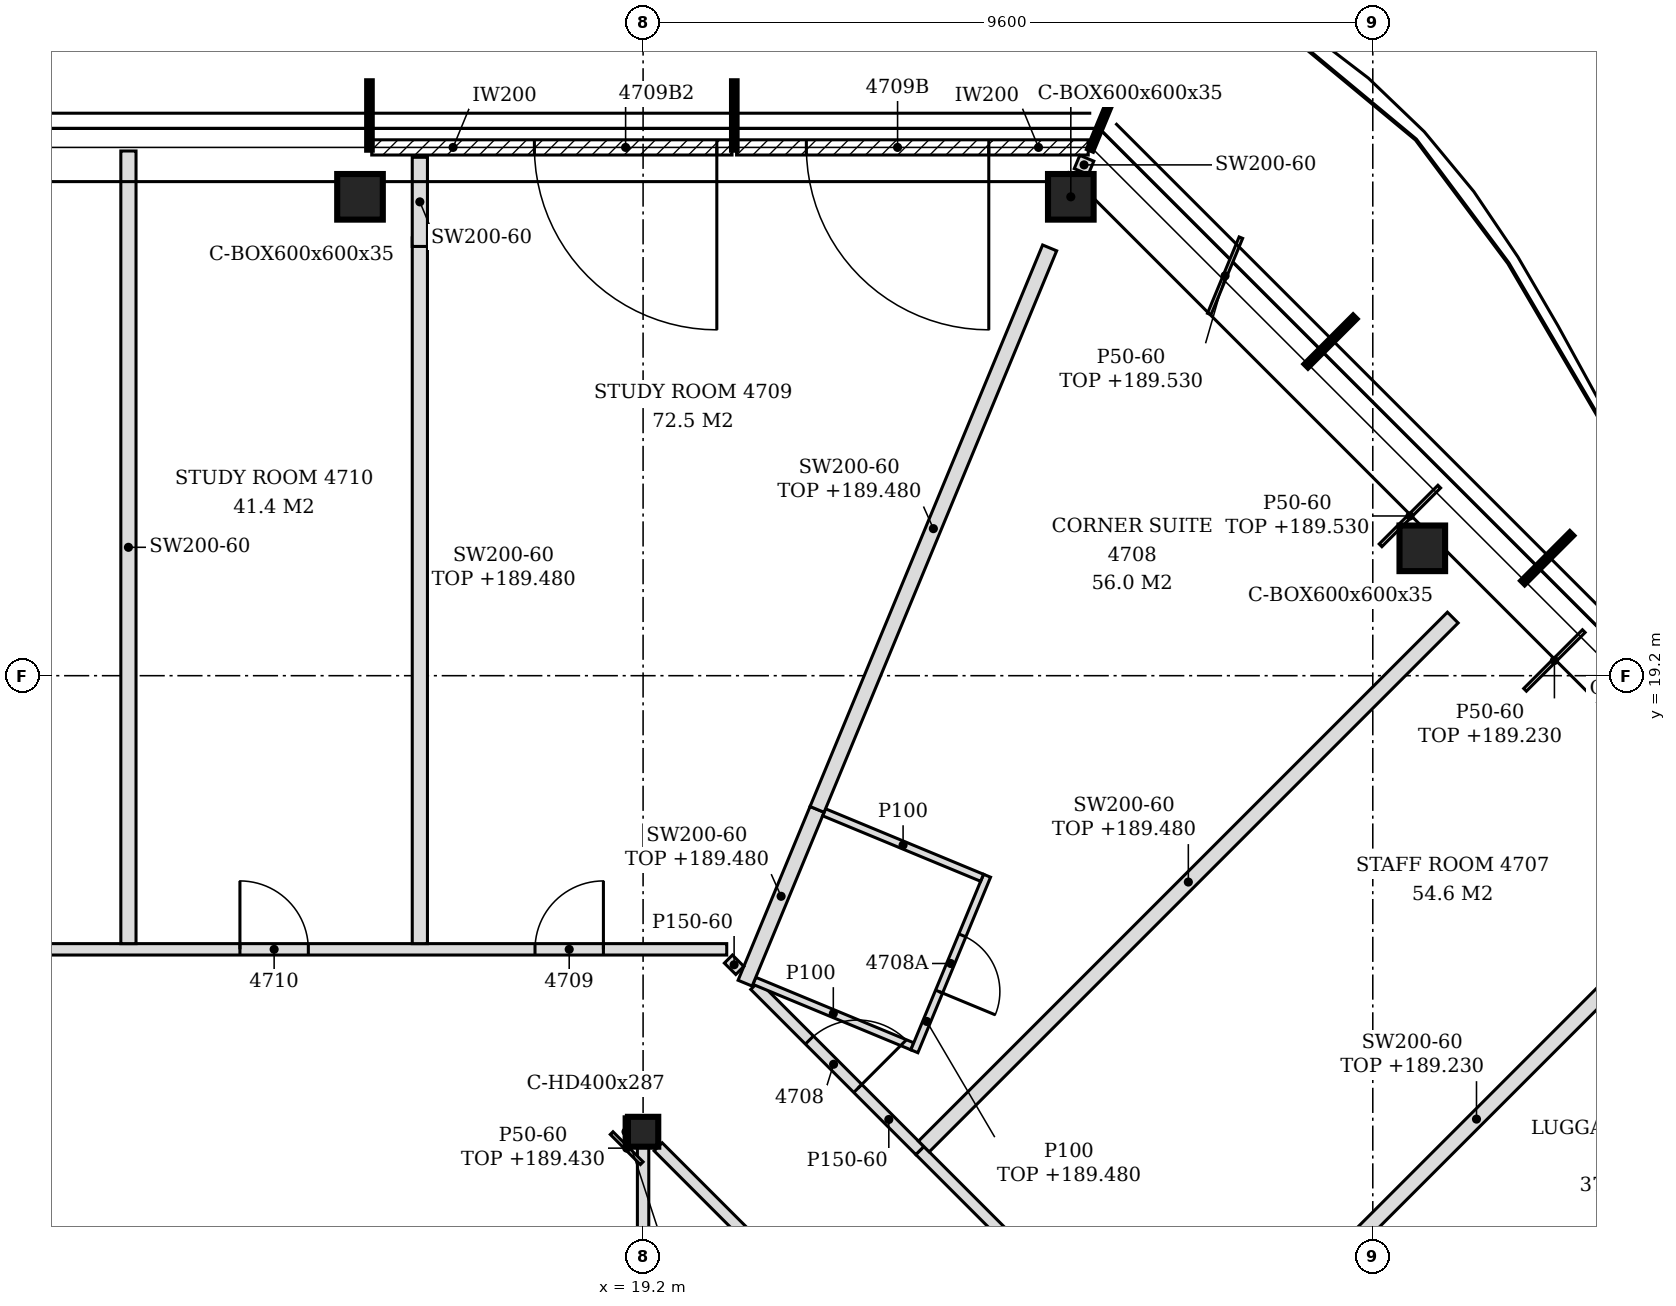
"""IFC4 building model, lengths in metres.
Left out: names, types, materials, properties, quantities, classifications, styles, units other than length and angle.
Written with IfcOpenShell. Run it as: python <this file> out.ifc"""

import sys

from ifc_helpers import new_model, si_unit, direction, frame, frame_2d, origin, origin_2d, place, context, subcontext, project, spatial, polyline, rectangle, hollow_rectangle, i_section, outline, extrude, clip, halfspace, element, fill, save


model = new_model("IFC4")
c1 = context("Model", 3, precision=1e-05, world=origin(), true_north=direction((0.0, 1.0)))
c2 = subcontext(c1, "Body", "Model", "MODEL_VIEW")
j1 = project(units=[si_unit("LENGTHUNIT", "METRE"), si_unit("PLANEANGLEUNIT", "RADIAN")], contexts=[c1])
p1 = place(None, origin())
s1 = spatial("IfcSite", under=j1, at=p1, CompositionType="ELEMENT")
p2 = place(p1, origin())
s2 = spatial("IfcBuilding", under=s1, at=p2, CompositionType="ELEMENT")
p3 = place(p2, frame((0.0, 0.0, 186.6)))
s3 = spatial("IfcBuildingStorey", under=s2, at=p3, CompositionType="ELEMENT", Elevation=186.6)
p4 = place(p3, frame((29.451, 20.876, -0.15), z_axis=(0.38726387287, -0.258155907814, 0.885088820419), x_axis=(0.554670435147, 0.832070134288, 0.0)))
e1 = element("IfcColumn", 1, at=p4, inside=s3, PredefinedType="COLUMN", context=c2, shape_type="Clipping", body=[
    clip(extrude(hollow_rectangle(XDim=0.6, YDim=0.6, WallThickness=0.035, at=origin_2d()), origin(), (0.0, 0.0, 1.0), 4.067), halfspace(frame((0.0, 0.0, 4.049), z_axis=(0.0, 0.0, 1.0), x_axis=(1.0, 0.0, 0.0)), False)),
])
p5 = place(p3, frame((24.827, 25.5, -0.15), z_axis=(0.387212850535, -0.258161908255, 0.885109392961), x_axis=(0.554729959787, 0.832030451194, 0.0)))
e2 = element("IfcColumn", 2, at=p5, inside=s3, PredefinedType="COLUMN", context=c2, shape_type="Clipping", body=[
    clip(extrude(hollow_rectangle(XDim=0.6, YDim=0.6, WallThickness=0.035, at=origin_2d()), origin(), (0.0, 0.0, 1.0), 4.067), halfspace(frame((0.0, 0.0, 4.049), z_axis=(0.0, 0.0, 1.0), x_axis=(1.0, 0.0, 0.0)), False)),
])
p6 = place(p3, frame((15.476, 25.5, -0.15), z_axis=(0.38726387287, -0.258155907814, 0.885088820419), x_axis=(0.554670435147, 0.832070134288, 0.0)))
e3 = element("IfcColumn", 3, at=p6, inside=s3, PredefinedType="COLUMN", context=c2, shape_type="Clipping", body=[
    clip(extrude(hollow_rectangle(XDim=0.6, YDim=0.6, WallThickness=0.035, at=origin_2d()), origin(), (0.0, 0.0, 1.0), 4.067), halfspace(frame((0.0, 0.0, 4.049), z_axis=(0.0, 0.0, 1.0), x_axis=(1.0, 0.0, 0.0)), False)),
])
p7 = place(p3, frame((19.2, 13.2, -0.15), z_axis=(0.0, 0.0, 1.0), x_axis=(1.0, 0.0, 0.0)))
e4 = element("IfcColumn", 4, at=p7, inside=s3, PredefinedType="COLUMN", context=c2, shape_type="SweptSolid", body=[
    extrude(i_section(OverallWidth=0.399, OverallDepth=0.393, WebThickness=0.023, FlangeThickness=0.037, FilletRadius=0.015, at=origin_2d()), origin(), (0.0, 0.0, 1.0), 3.6),
])
p8 = place(p3, frame((25.056, 26.15, 0.0), z_axis=(0.0, 0.0, 1.0), x_axis=(-1.0, 0.0, 0.0)))
e5 = element("IfcWall", 5, at=p8, inside=s3, PredefinedType="NOTDEFINED", context=c2, shape_type="SweptSolid", body=[
    extrude(rectangle(XDim=4.626, YDim=0.2, at=frame_2d((2.313, 0.0))), origin(), (0.0, 0.0, 1.0), 3.45),
])
p9 = place(p8, frame((1.308, 0.0, 0.0)))
e6 = element("IfcOpeningElement", 6, at=p9, cuts=e5, PredefinedType="OPENING", context=c2, shape_type="SweptSolid", body=[
    extrude(rectangle(XDim=2.4, YDim=2.4, at=frame_2d((1.2, 1.2))), frame((0.0, 0.11, 0.0), z_axis=(0.0, -1.0, 0.0), x_axis=(1.0, 0.0, 0.0)), (0.0, 0.0, 1.0), 0.22),
])
p10 = place(p3, frame((20.37, 26.15, 0.0), z_axis=(0.0, 0.0, 1.0), x_axis=(-1.0, 0.0, 0.0)))
e7 = element("IfcWall", 7, at=p10, inside=s3, PredefinedType="NOTDEFINED", context=c2, shape_type="SweptSolid", body=[
    extrude(rectangle(XDim=4.74, YDim=0.2, at=frame_2d((2.37, 0.0))), origin(), (0.0, 0.0, 1.0), 3.45),
])
p11 = place(p10, frame((0.2, 0.0, 0.0)))
e8 = element("IfcOpeningElement", 8, at=p11, cuts=e7, PredefinedType="OPENING", context=c2, shape_type="SweptSolid", body=[
    extrude(rectangle(XDim=2.4, YDim=2.4, at=frame_2d((1.2, 1.2))), frame((0.0, 0.11, 0.0), z_axis=(0.0, -1.0, 0.0), x_axis=(1.0, 0.0, 0.0)), (0.0, 0.0, 1.0), 0.22),
])
p12 = place(p3, frame((19.2, 2.596, 0.0), z_axis=(0.0, 0.0, 1.0), x_axis=(0.0, 1.0, 0.0)))
e9 = element("IfcWall", 9, at=p12, inside=s3, PredefinedType="PARTITIONING", context=c2, shape_type="SweptSolid", body=[
    extrude(rectangle(XDim=10.407, YDim=0.15, at=frame_2d((5.204, 0.0))), origin(), (0.0, 0.0, 1.0), 2.83),
])
p13 = place(p12, frame((0.553, 0.0, 0.0)))
e10 = element("IfcOpeningElement", 10, at=p13, cuts=e9, PredefinedType="OPENING", context=c2, shape_type="SweptSolid", body=[
    extrude(rectangle(XDim=0.9, YDim=2.1, at=frame_2d((0.45, 1.05))), frame((0.0, 0.085, 0.0), z_axis=(0.0, -1.0, 0.0), x_axis=(1.0, 0.0, 0.0)), (0.0, 0.0, 1.0), 0.17),
])
p14 = place(p3, frame((27.529, 4.871, 0.0), z_axis=(0.0, 0.0, 1.0), x_axis=(-0.707106781187, 0.707106781187, 0.0)))
e11 = element("IfcWall", 11, at=p14, inside=s3, PredefinedType="PARTITIONING", context=c2, shape_type="SweptSolid", body=[
    extrude(rectangle(XDim=11.5, YDim=0.15, at=frame_2d((5.75, 0.0))), origin(), (0.0, 0.0, 1.0), 2.88),
])
p15 = place(p14, frame((0.85, 0.0, 0.0)))
e12 = element("IfcOpeningElement", 12, at=p15, cuts=e11, PredefinedType="OPENING", context=c2, shape_type="SweptSolid", body=[
    extrude(rectangle(XDim=0.8, YDim=2.1, at=frame_2d((0.4, 1.05))), frame((0.0, 0.085, 0.0), z_axis=(0.0, -1.0, 0.0), x_axis=(1.0, 0.0, 0.0)), (0.0, 0.0, 1.0), 0.17),
])
p16 = place(p3, frame((29.872, 5.922, 0.0), z_axis=(0.0, 0.0, 1.0), x_axis=(-0.707119057879, 0.707094504281, 0.0)))
e13 = element("IfcWall", 13, at=p16, inside=s3, PredefinedType="PARTITIONING", context=c2, shape_type="SweptSolid", body=[
    extrude(rectangle(XDim=9.943, YDim=0.15, at=frame_2d((4.972, 0.0))), origin(), (0.0, 0.0, 1.0), 2.88),
])
p17 = place(p16, frame((2.909, 0.0, 0.0)))
e14 = element("IfcOpeningElement", 14, at=p17, cuts=e13, PredefinedType="OPENING", context=c2, shape_type="SweptSolid", body=[
    extrude(rectangle(XDim=0.9, YDim=2.1, at=frame_2d((0.45, 1.05))), frame((0.0, 0.085, 0.0), z_axis=(0.0, -1.0, 0.0), x_axis=(1.0, 0.0, 0.0)), (0.0, 0.0, 1.0), 0.17),
])
p18 = place(p16, frame((7.05, 0.0, 0.0)))
e15 = element("IfcOpeningElement", 15, at=p18, cuts=e13, PredefinedType="OPENING", context=c2, shape_type="SweptSolid", body=[
    extrude(rectangle(XDim=0.9, YDim=2.1, at=frame_2d((0.45, 1.05))), frame((0.0, 0.085, 0.0), z_axis=(0.0, -1.0, 0.0), x_axis=(1.0, 0.0, 0.0)), (0.0, 0.0, 1.0), 0.17),
])
p19 = place(p3, frame((26.349, 9.551, 0.0), z_axis=(0.0, 0.0, 1.0), x_axis=(0.707095469378, 0.707118092814, 0.0)))
e16 = element("IfcWall", 16, at=p19, inside=s3, PredefinedType="PARTITIONING", context=c2, shape_type="SweptSolid", body=[
    extrude(rectangle(XDim=10.792, YDim=0.2, at=frame_2d((5.396, 0.0))), origin(), (0.0, 0.0, 1.0), 2.63),
])
p20 = place(p3, frame((31.408, 9.809, 0.0), z_axis=(0.0, 0.0, 1.0), x_axis=(0.707124140529, 0.707089421418, 0.0)))
e17 = element("IfcWall", 17, at=p20, inside=s3, PredefinedType="PARTITIONING", context=c2, shape_type="SweptSolid", body=[
    extrude(rectangle(XDim=7.032, YDim=0.2, at=frame_2d((3.516, 0.0))), origin(), (0.0, 0.0, 1.0), 2.93),
])
p21 = place(p20, frame((1.304, 0.0, 0.0)))
e18 = element("IfcOpeningElement", 18, at=p21, cuts=e17, PredefinedType="OPENING", context=c2, shape_type="SweptSolid", body=[
    extrude(rectangle(XDim=0.9, YDim=2.1, at=frame_2d((0.45, 1.05))), frame((0.0, 0.11, 0.0), z_axis=(0.0, -1.0, 0.0), x_axis=(1.0, 0.0, 0.0)), (0.0, 0.0, 1.0), 0.22),
])
p22 = place(p3, frame((22.841, 12.953, 0.0), z_axis=(0.0, 0.0, 1.0), x_axis=(-0.706947809344, 0.707265717297, 0.0)))
e19 = element("IfcWall", 19, at=p22, inside=s3, PredefinedType="PARTITIONING", context=c2, shape_type="SweptSolid", body=[
    extrude(rectangle(XDim=3.072, YDim=0.15, at=frame_2d((1.536, 0.0))), origin(), (0.0, 0.0, 1.0), 3.45),
])
p23 = place(p22, frame((1.155, 0.0, 0.0)))
e20 = element("IfcOpeningElement", 20, at=p23, cuts=e19, PredefinedType="OPENING", context=c2, shape_type="SweptSolid", body=[
    extrude(rectangle(XDim=0.9, YDim=2.1, at=frame_2d((0.45, 1.05))), frame((0.0, 0.085, 0.0), z_axis=(0.0, -1.0, 0.0), x_axis=(1.0, 0.0, 0.0)), (0.0, 0.0, 1.0), 0.17),
])
p24 = place(p3, frame((22.894, 13.006, 0.0), z_axis=(0.0, 0.0, 1.0), x_axis=(0.707106781187, 0.707106781187, 0.0)))
e21 = element("IfcWall", 21, at=p24, inside=s3, PredefinedType="PARTITIONING", context=c2, shape_type="SweptSolid", body=[
    extrude(rectangle(XDim=9.841, YDim=0.2, at=frame_2d((4.92, 0.0))), origin(), (0.0, 0.0, 1.0), 2.88),
])
p25 = place(p3, frame((22.742, 14.324, 0.0), z_axis=(0.0, 0.0, 1.0), x_axis=(-0.923772075785, 0.382942752901, 0.0)))
e22 = element("IfcWall", 22, at=p25, inside=s3, PredefinedType="PARTITIONING", context=c2, shape_type="SweptSolid", body=[
    extrude(rectangle(XDim=2.25, YDim=0.1, at=frame_2d((1.125, 0.0))), origin(), (0.0, 0.0, 1.0), 3.45),
])
p26 = place(p3, frame((22.769, 14.259, 0.0), z_axis=(0.0, 0.0, 1.0), x_axis=(0.382596216825, 0.923915653548, 0.0)))
e23 = element("IfcWall", 23, at=p26, inside=s3, PredefinedType="PARTITIONING", context=c2, shape_type="SweptSolid", body=[
    extrude(rectangle(XDim=2.5, YDim=0.1, at=frame_2d((1.25, 0.0))), origin(), (0.0, 0.0, 1.0), 2.88),
])
p27 = place(p26, frame((0.85, 0.0, 0.0)))
e24 = element("IfcOpeningElement", 24, at=p27, cuts=e23, PredefinedType="OPENING", context=c2, shape_type="SweptSolid", body=[
    extrude(rectangle(XDim=0.8, YDim=2.1, at=frame_2d((0.4, 1.05))), frame((0.0, 0.06, 0.0), z_axis=(0.0, -1.0, 0.0), x_axis=(1.0, 0.0, 0.0)), (0.0, 0.0, 1.0), 0.12),
])
p28 = place(p3, frame((20.542, 15.155, 0.0), z_axis=(0.0, 0.0, 1.0), x_axis=(0.382624834073, 0.923903802542, 0.0)))
e25 = element("IfcWall", 25, at=p28, inside=s3, PredefinedType="PARTITIONING", context=c2, shape_type="SweptSolid", body=[
    extrude(rectangle(XDim=2.474, YDim=0.2, at=frame_2d((1.237, 0.0))), origin(), (0.0, 0.0, 1.0), 2.88),
])
p29 = place(p3, frame((20.472, 15.322, 0.0), z_axis=(0.0, 0.0, 1.0), x_axis=(-0.707682835304, 0.706530257396, 0.0)))
e26 = element("IfcWall", 26, at=p29, inside=s3, PredefinedType="PARTITIONING", context=c2, shape_type="SweptSolid", body=[
    extrude(rectangle(XDim=0.212, YDim=0.15, at=frame_2d((0.106, 0.0))), origin(), (0.0, 0.0, 1.0), 3.45),
])
p30 = place(p3, frame((-5.9, 15.6, 0.0), z_axis=(0.0, 0.0, 1.0), x_axis=(1.0, 0.0, 0.0)))
e27 = element("IfcWall", 27, at=p30, inside=s3, PredefinedType="PARTITIONING", context=c2, shape_type="SweptSolid", body=[
    extrude(outline(polyline([(0.0, 0.0), (26.2, 0.0), (26.2, 2.88), (25.25, 2.88), (25.248, 2.83), (24.95, 2.83), (24.948, 2.88), (13.25, 2.88), (13.248, 2.83), (12.95, 2.83), (12.948, 2.88), (1.25, 2.88), (1.248, 2.93), (0.95, 2.93), (0.948, 3.45), (0.0, 3.45), (0.0, 0.0)])), frame((0.0, 0.075, 0.0), z_axis=(0.0, -1.0, 0.0), x_axis=(1.0, 0.0, 0.0)), (0.0, 0.0, 1.0), 0.15),
])
p31 = place(p30, frame((23.678, 0.0, 0.0)))
e28 = element("IfcOpeningElement", 28, at=p31, cuts=e27, PredefinedType="OPENING", context=c2, shape_type="SweptSolid", body=[
    extrude(rectangle(XDim=0.9, YDim=2.1, at=frame_2d((0.45, 1.05))), frame((0.0, 0.085, 0.0), z_axis=(0.0, -1.0, 0.0), x_axis=(1.0, 0.0, 0.0)), (0.0, 0.0, 1.0), 0.17),
])
p32 = place(p30, frame((19.796, 0.0, 0.0)))
e29 = element("IfcOpeningElement", 29, at=p32, cuts=e27, PredefinedType="OPENING", context=c2, shape_type="SweptSolid", body=[
    extrude(rectangle(XDim=0.9, YDim=2.1, at=frame_2d((0.45, 1.05))), frame((0.0, 0.085, 0.0), z_axis=(0.0, -1.0, 0.0), x_axis=(1.0, 0.0, 0.0)), (0.0, 0.0, 1.0), 0.17),
])
p33 = place(p30, frame((15.121, 0.0, 0.0)))
e30 = element("IfcOpeningElement", 30, at=p33, cuts=e27, PredefinedType="OPENING", context=c2, shape_type="SweptSolid", body=[
    extrude(rectangle(XDim=0.9, YDim=2.1, at=frame_2d((0.45, 1.05))), frame((0.0, 0.085, 0.0), z_axis=(0.0, -1.0, 0.0), x_axis=(1.0, 0.0, 0.0)), (0.0, 0.0, 1.0), 0.17),
])
p34 = place(p30, frame((10.543, 0.0, 0.0)))
e31 = element("IfcOpeningElement", 31, at=p34, cuts=e27, PredefinedType="OPENING", context=c2, shape_type="SweptSolid", body=[
    extrude(rectangle(XDim=0.9, YDim=2.1, at=frame_2d((0.45, 1.05))), frame((0.0, 0.085, 0.0), z_axis=(0.0, -1.0, 0.0), x_axis=(1.0, 0.0, 0.0)), (0.0, 0.0, 1.0), 0.17),
])
p35 = place(p30, frame((4.73, 0.0, 0.0)))
e32 = element("IfcOpeningElement", 32, at=p35, cuts=e27, PredefinedType="OPENING", context=c2, shape_type="SweptSolid", body=[
    extrude(rectangle(XDim=0.9, YDim=2.1, at=frame_2d((0.45, 1.05))), frame((0.0, 0.085, 0.0), z_axis=(0.0, -1.0, 0.0), x_axis=(1.0, 0.0, 0.0)), (0.0, 0.0, 1.0), 0.17),
])
p36 = place(p30, frame((1.396, 0.0, 0.0)))
e33 = element("IfcOpeningElement", 33, at=p36, cuts=e27, PredefinedType="OPENING", context=c2, shape_type="SweptSolid", body=[
    extrude(rectangle(XDim=0.9, YDim=2.1, at=frame_2d((0.45, 1.05))), frame((0.0, 0.085, 0.0), z_axis=(0.0, -1.0, 0.0), x_axis=(1.0, 0.0, 0.0)), (0.0, 0.0, 1.0), 0.17),
])
p37 = place(p3, frame((12.429, 15.675, 0.0), z_axis=(0.0, 0.0, 1.0), x_axis=(0.0, 1.0, 0.0)))
e34 = element("IfcWall", 34, at=p37, inside=s3, PredefinedType="PARTITIONING", context=c2, shape_type="SweptSolid", body=[
    extrude(outline(polyline([(0.0, 0.0), (10.428, 0.0), (10.428, 3.45), (8.925, 3.45), (8.923, 2.93), (8.625, 2.93), (8.623, 3.45), (4.98, 3.45), (4.978, 2.88), (4.77, 2.88), (4.768, 3.45), (0.18, 3.45), (0.178, 2.88), (0.0, 2.88), (0.0, 0.0)])), frame((0.0, 0.1, 0.0), z_axis=(0.0, -1.0, 0.0), x_axis=(1.0, 0.0, 0.0)), (0.0, 0.0, 1.0), 0.2),
])
p38 = place(p3, frame((16.263, 15.675, 0.0), z_axis=(0.0, 0.0, 1.0), x_axis=(0.0, 1.0, 0.0)))
e35 = element("IfcWall", 35, at=p38, inside=s3, PredefinedType="PARTITIONING", context=c2, shape_type="SweptSolid", body=[
    extrude(outline(polyline([(0.0, 0.0), (9.285, 0.0), (9.285, 0.862), (8.873, 1.725), (8.873, 2.587), (8.873, 2.88), (0.0, 2.88), (0.0, 2.587), (0.0, 1.725), (0.0, 0.862), (0.0, 0.0)])), frame((0.0, 0.1, 0.0), z_axis=(0.0, -1.0, 0.0), x_axis=(1.0, 0.0, 0.0)), (0.0, 0.0, 1.0), 0.2),
])
p39 = place(p3, frame((23.66, 16.541, 0.0), z_axis=(0.0, 0.0, 1.0), x_axis=(-0.923826362943, 0.382811769845, 0.0)))
e36 = element("IfcWall", 36, at=p39, inside=s3, PredefinedType="PARTITIONING", context=c2, shape_type="SweptSolid", body=[
    extrude(rectangle(XDim=2.25, YDim=0.1, at=frame_2d((1.125, 0.0))), origin(), (0.0, 0.0, 1.0), 3.45),
])
p40 = place(p3, frame((21.489, 17.441, 0.0), z_axis=(0.0, 0.0, 1.0), x_axis=(0.382687087481, 0.923878018504, 0.0)))
e37 = element("IfcWall", 37, at=p40, inside=s3, PredefinedType="PARTITIONING", context=c2, shape_type="SweptSolid", body=[
    extrude(rectangle(XDim=7.996, YDim=0.2, at=frame_2d((3.998, 0.0))), origin(), (0.0, 0.0, 1.0), 2.88),
])
p41 = place(p3, frame((16.263, 24.847, 0.0), z_axis=(0.0, 0.0, 1.0), x_axis=(0.0, 1.0, 0.0)))
e38 = element("IfcWall", 38, at=p41, inside=s3, PredefinedType="PARTITIONING", context=c2, shape_type="SweptSolid", body=[
    extrude(outline(polyline([(0.555, 0.0), (1.173, 0.0), (1.173, 0.862), (1.173, 1.725), (1.173, 2.587), (1.173, 3.45), (0.0, 3.45), (0.0, 2.587), (0.544, 1.725), (0.555, 0.862), (0.555, 0.0)])), frame((0.0, 0.1, 0.0), z_axis=(0.0, -1.0, 0.0), x_axis=(1.0, 0.0, 0.0)), (0.0, 0.0, 1.0), 0.2),
])
p42 = place(p3, frame((24.965, 25.833, 0.0), z_axis=(0.0, 0.0, 1.0), x_axis=(0.382047769144, 0.924142576712, 0.0)))
e39 = element("IfcWall", 39, at=p42, inside=s3, PredefinedType="PARTITIONING", context=c2, shape_type="SweptSolid", body=[
    extrude(rectangle(XDim=0.189, YDim=0.2, at=frame_2d((0.095, 0.0))), origin(), (0.0, 0.0, 1.0), 3.45),
])
p43 = place(p3, frame((18.976, 13.003, 0.0), z_axis=(0.0, 0.0, 1.0), x_axis=(0.0, 1.0, 0.0)))
e40 = element("IfcWall", 40, at=p43, inside=s3, PredefinedType="PARTITIONING", context=c2, shape_type="SweptSolid", body=[
    extrude(rectangle(XDim=0.393, YDim=0.05, at=frame_2d((0.197, 0.0))), origin(), (0.0, 0.0, 1.0), 2.83),
])
p44 = place(p3, frame((19.182, 12.786, 0.0), z_axis=(0.0, 0.0, 1.0), x_axis=(-0.707106781187, 0.707106781187, 0.0)))
e41 = element("IfcWall", 41, at=p44, inside=s3, PredefinedType="PARTITIONING", context=c2, shape_type="SweptSolid", body=[
    extrude(rectangle(XDim=0.56, YDim=0.05, at=frame_2d((0.28, 0.0))), origin(), (0.0, 0.0, 1.0), 2.83),
])
p45 = place(p3, frame((28.902, 20.915, 0.0), z_axis=(0.0, 0.0, 1.0), x_axis=(0.707218497241, 0.706995047479, 0.0)))
e42 = element("IfcWall", 42, at=p45, inside=s3, PredefinedType="PARTITIONING", context=c2, shape_type="SweptSolid", body=[
    extrude(rectangle(XDim=1.093, YDim=0.05, at=frame_2d((0.546, 0.0))), origin(), (0.0, 0.0, 1.0), 2.93),
])
p46 = place(p3, frame((30.803, 19.014, 0.0), z_axis=(0.0, 0.0, 1.0), x_axis=(0.707106781187, 0.707106781187, 0.0)))
e43 = element("IfcWall", 43, at=p46, inside=s3, PredefinedType="PARTITIONING", context=c2, shape_type="SweptSolid", body=[
    extrude(rectangle(XDim=1.093, YDim=0.05, at=frame_2d((0.546, 0.0))), origin(), (0.0, 0.0, 1.0), 2.63),
])
p47 = place(p3, frame((26.648, 23.958, 0.0), z_axis=(0.0, 0.0, 1.0), x_axis=(0.382781388275, 0.923838951761, 0.0)))
e44 = element("IfcWall", 44, at=p47, inside=s3, PredefinedType="PARTITIONING", context=c2, shape_type="SweptSolid", body=[
    extrude(rectangle(XDim=1.087, YDim=0.05, at=frame_2d((0.544, 0.0))), origin(), (0.0, 0.0, 1.0), 2.93),
])
p48 = place(p9, origin())
e45 = element("IfcDoor", 45, at=p48, inside=s3, OperationType="SINGLE_SWING_LEFT", PredefinedType="DOOR", context=c2, shape_type="SweptSolid", body=[
    extrude(rectangle(XDim=2.4, YDim=2.4, at=frame_2d((1.2, 1.2))), frame((0.0, 0.025, 0.0), z_axis=(0.0, -1.0, 0.0), x_axis=(1.0, 0.0, 0.0)), (0.0, 0.0, 1.0), 0.05),
])
fill(e6, e45)
p49 = place(p11, origin())
e46 = element("IfcDoor", 46, at=p49, inside=s3, OperationType="SINGLE_SWING_LEFT", PredefinedType="DOOR", context=c2, shape_type="SweptSolid", body=[
    extrude(rectangle(XDim=2.4, YDim=2.4, at=frame_2d((1.2, 1.2))), frame((0.0, 0.025, 0.0), z_axis=(0.0, -1.0, 0.0), x_axis=(1.0, 0.0, 0.0)), (0.0, 0.0, 1.0), 0.05),
])
fill(e8, e46)
p50 = place(p23, frame((0.9, 0.0, 0.0), z_axis=(0.0, 0.0, 1.0), x_axis=(-1.0, 0.0, 0.0)))
e47 = element("IfcDoor", 47, at=p50, inside=s3, OperationType="SINGLE_SWING_RIGHT", PredefinedType="DOOR", context=c2, shape_type="SweptSolid", body=[
    extrude(rectangle(XDim=0.9, YDim=2.1, at=frame_2d((0.45, 1.05))), frame((0.0, 0.025, 0.0), z_axis=(0.0, -1.0, 0.0), x_axis=(1.0, 0.0, 0.0)), (0.0, 0.0, 1.0), 0.05),
])
fill(e20, e47)
p51 = place(p27, frame((0.8, 0.0, 0.0), z_axis=(0.0, 0.0, 1.0), x_axis=(-1.0, 0.0, 0.0)))
e48 = element("IfcDoor", 48, at=p51, inside=s3, OperationType="SINGLE_SWING_RIGHT", PredefinedType="DOOR", context=c2, shape_type="SweptSolid", body=[
    extrude(rectangle(XDim=0.8, YDim=2.1, at=frame_2d((0.4, 1.05))), frame((0.0, 0.025, 0.0), z_axis=(0.0, -1.0, 0.0), x_axis=(1.0, 0.0, 0.0)), (0.0, 0.0, 1.0), 0.05),
])
fill(e24, e48)
p52 = place(p31, origin())
e49 = element("IfcDoor", 49, at=p52, inside=s3, OperationType="SINGLE_SWING_RIGHT", PredefinedType="DOOR", context=c2, shape_type="SweptSolid", body=[
    extrude(rectangle(XDim=0.9, YDim=2.1, at=frame_2d((0.45, 1.05))), frame((0.0, 0.025, 0.0), z_axis=(0.0, -1.0, 0.0), x_axis=(1.0, 0.0, 0.0)), (0.0, 0.0, 1.0), 0.05),
])
fill(e28, e49)
p53 = place(p32, origin())
e50 = element("IfcDoor", 50, at=p53, inside=s3, OperationType="SINGLE_SWING_LEFT", PredefinedType="DOOR", context=c2, shape_type="SweptSolid", body=[
    extrude(rectangle(XDim=0.9, YDim=2.1, at=frame_2d((0.45, 1.05))), frame((0.0, 0.025, 0.0), z_axis=(0.0, -1.0, 0.0), x_axis=(1.0, 0.0, 0.0)), (0.0, 0.0, 1.0), 0.05),
])
fill(e29, e50)
save(model, sys.argv[1])
